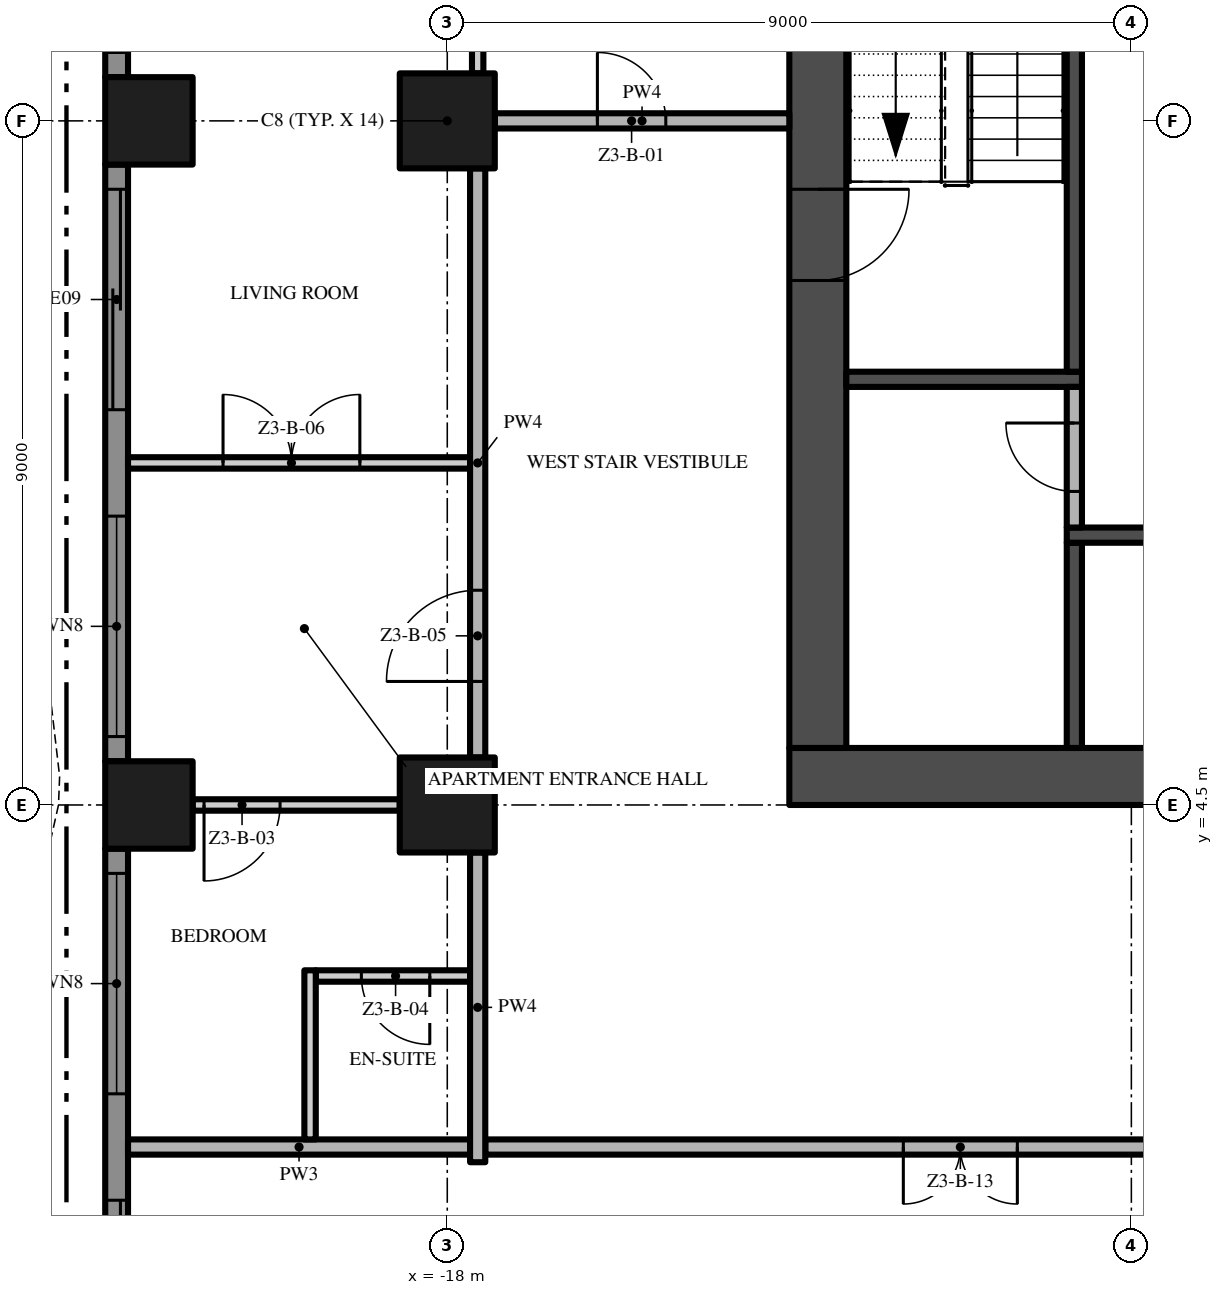
"""IFC4 building model, lengths in metres.
Left out: names, types, materials, properties, quantities, classifications, styles, units other than length and angle.
Written with IfcOpenShell. Run it as: python <this file> out.ifc"""

import sys

from ifc_helpers import new_model, si_unit, direction, frame, frame_2d, origin, origin_2d, place, context, subcontext, project, spatial, polyline, rectangle, outline, extrude, element, fill, save


model = new_model("IFC4")
c1 = context("Model", 3, precision=1e-05, world=origin(), true_north=direction((0.0, 1.0)))
c2 = subcontext(c1, "Body", "Model", "MODEL_VIEW")
j1 = project(units=[si_unit("LENGTHUNIT", "METRE"), si_unit("PLANEANGLEUNIT", "RADIAN")], contexts=[c1])
p1 = place(None, origin())
s1 = spatial("IfcSite", under=j1, at=p1, CompositionType="ELEMENT")
p2 = place(p1, origin())
s2 = spatial("IfcBuilding", under=s1, at=p2, CompositionType="ELEMENT")
p3 = place(p2, frame((0.0, 0.0, 140.2)))
s3 = spatial("IfcBuildingStorey", under=s2, at=p3, CompositionType="ELEMENT", Elevation=140.2)
p4 = place(p3, frame((-13.5, 4.875, -0.3), z_axis=(0.0, 0.0, 1.0), x_axis=(1.0, 0.0, 0.0)))
e1 = element("IfcWall", 1, at=p4, inside=s3, PredefinedType="SHEAR", context=c2, shape_type="SweptSolid", body=[
    extrude(rectangle(XDim=27.0, YDim=0.75, at=frame_2d((13.5, 0.0))), origin(), (0.0, 0.0, 1.0), 3.8),
])
p5 = place(p4, frame((12.0, 0.0, 0.3)))
e2 = element("IfcOpeningElement", 2, at=p5, cuts=e1, PredefinedType="OPENING", context=c2, shape_type="SweptSolid", body=[
    extrude(rectangle(XDim=3.0, YDim=2.4, at=frame_2d((1.5, 1.2))), frame((0.0, 0.385, 0.0), z_axis=(0.0, -1.0, 0.0), x_axis=(1.0, 0.0, 0.0)), (0.0, 0.0, 1.0), 0.77),
])
p6 = place(p4, frame((4.9, 0.0, 0.3)))
e3 = element("IfcOpeningElement", 3, at=p6, cuts=e1, PredefinedType="OPENING", context=c2, shape_type="SweptSolid", body=[
    extrude(rectangle(XDim=1.2, YDim=2.2, at=frame_2d((0.6, 1.1))), frame((0.0, 0.385, 0.0), z_axis=(0.0, -1.0, 0.0), x_axis=(1.0, 0.0, 0.0)), (0.0, 0.0, 1.0), 0.77),
])
p7 = place(p4, frame((20.75, 0.0, 0.3)))
e4 = element("IfcOpeningElement", 4, at=p7, cuts=e1, PredefinedType="OPENING", context=c2, shape_type="SweptSolid", body=[
    extrude(rectangle(XDim=1.5, YDim=2.2, at=frame_2d((0.75, 1.1))), frame((0.0, 0.385, 0.0), z_axis=(0.0, -1.0, 0.0), x_axis=(1.0, 0.0, 0.0)), (0.0, 0.0, 1.0), 0.77),
])
p8 = place(p4, frame((17.4, 0.0, 0.3)))
e5 = element("IfcOpeningElement", 5, at=p8, cuts=e1, PredefinedType="OPENING", context=c2, shape_type="SweptSolid", body=[
    extrude(rectangle(XDim=1.2, YDim=2.2, at=frame_2d((0.6, 1.1))), frame((0.0, 0.385, 0.0), z_axis=(0.0, -1.0, 0.0), x_axis=(1.0, 0.0, 0.0)), (0.0, 0.0, 1.0), 0.77),
])
p9 = place(p3, frame((-13.125, 21.75, -0.3), z_axis=(0.0, 0.0, 1.0), x_axis=(0.0, -1.0, 0.0)))
e6 = element("IfcWall", 6, at=p9, inside=s3, PredefinedType="SHEAR", context=c2, shape_type="SweptSolid", body=[
    extrude(rectangle(XDim=16.5, YDim=0.75, at=frame_2d((8.25, 0.0))), origin(), (0.0, 0.0, 1.0), 3.8),
])
p10 = place(p9, frame((9.15, 0.0, 0.3)))
e7 = element("IfcOpeningElement", 7, at=p10, cuts=e6, PredefinedType="OPENING", context=c2, shape_type="SweptSolid", body=[
    extrude(rectangle(XDim=1.2, YDim=2.2, at=frame_2d((0.6, 1.1))), frame((0.0, 0.385, 0.0), z_axis=(0.0, -1.0, 0.0), x_axis=(1.0, 0.0, 0.0)), (0.0, 0.0, 1.0), 0.77),
])
for number, where, z_axis, x_axis in (
    (8, (-18.0, 13.5, 0.0), (0.0, 0.0, 1.0), (1.0, 0.0, 0.0)),
    (9, (-18.0, 4.5, 0.0), (0.0, 0.0, 1.0), (1.0, 0.0, 0.0)),
):
    element("IfcColumn", number, at=place(p3, frame(where, z_axis=z_axis, x_axis=x_axis)), inside=s3, PredefinedType="COLUMN", context=c2, shape_type="SweptSolid", body=[
        extrude(rectangle(XDim=1.25, YDim=1.25, at=origin_2d()), origin(), (0.0, 0.0, 1.0), 3.5),
    ])
for number, where, z_axis, x_axis in (
    (10, (-21.925, 13.5, 0.0), (0.0, 0.0, 1.0), (1.0, 0.0, 0.0)),
    (11, (-21.925, 4.5, 0.0), (0.0, 0.0, 1.0), (1.0, 0.0, 0.0)),
):
    element("IfcColumn", number, at=place(p3, frame(where, z_axis=z_axis, x_axis=x_axis)), inside=s3, PredefinedType="COLUMN", context=c2, shape_type="SweptSolid", body=[
        extrude(rectangle(XDim=1.15, YDim=1.15, at=origin_2d()), origin(), (0.0, 0.0, 1.0), 3.5),
    ])
p11 = place(p3, frame((-22.35, 14.075, 0.0), z_axis=(0.0, 0.0, 1.0), x_axis=(0.0, 1.0, 0.0)))
e12 = element("IfcWall", 12, at=p11, inside=s3, PredefinedType="SOLIDWALL", context=c2, shape_type="SweptSolid", body=[
    extrude(rectangle(XDim=3.625, YDim=0.3, at=frame_2d((1.812, 0.0))), origin(), (0.0, 0.0, 1.0), 3.5),
])
p12 = place(p11, frame((0.325, 0.0, 0.45)))
e13 = element("IfcOpeningElement", 13, at=p12, cuts=e12, PredefinedType="OPENING", context=c2, shape_type="SweptSolid", body=[
    extrude(rectangle(XDim=2.9, YDim=2.65, at=frame_2d((1.45, 1.325))), frame((0.0, 0.16, 0.0), z_axis=(0.0, -1.0, 0.0), x_axis=(1.0, 0.0, 0.0)), (0.0, 0.0, 1.0), 0.32),
])
p13 = place(p3, frame((-22.35, 5.075, 0.0), z_axis=(0.0, 0.0, 1.0), x_axis=(0.0, 1.0, 0.0)))
e14 = element("IfcWall", 14, at=p13, inside=s3, PredefinedType="SOLIDWALL", context=c2, shape_type="SweptSolid", body=[
    extrude(rectangle(XDim=7.85, YDim=0.3, at=frame_2d((3.925, 0.0))), origin(), (0.0, 0.0, 1.0), 3.5),
])
p14 = place(p13, frame((4.625, 0.0, 0.0)))
e15 = element("IfcOpeningElement", 15, at=p14, cuts=e14, PredefinedType="OPENING", context=c2, shape_type="SweptSolid", body=[
    extrude(rectangle(XDim=2.9, YDim=2.4, at=frame_2d((1.45, 1.2))), frame((0.0, 0.16, 0.0), z_axis=(0.0, -1.0, 0.0), x_axis=(1.0, 0.0, 0.0)), (0.0, 0.0, 1.0), 0.32),
])
p15 = place(p13, frame((0.325, 0.0, 0.45)))
e16 = element("IfcOpeningElement", 16, at=p15, cuts=e14, PredefinedType="OPENING", context=c2, shape_type="SweptSolid", body=[
    extrude(rectangle(XDim=2.9, YDim=2.65, at=frame_2d((1.45, 1.325))), frame((0.0, 0.16, 0.0), z_axis=(0.0, -1.0, 0.0), x_axis=(1.0, 0.0, 0.0)), (0.0, 0.0, 1.0), 0.32),
])
p16 = place(p3, frame((-22.35, -3.925, 0.0), z_axis=(0.0, 0.0, 1.0), x_axis=(0.0, 1.0, 0.0)))
e17 = element("IfcWall", 17, at=p16, inside=s3, PredefinedType="SOLIDWALL", context=c2, shape_type="SweptSolid", body=[
    extrude(rectangle(XDim=7.85, YDim=0.3, at=frame_2d((3.925, 0.0))), origin(), (0.0, 0.0, 1.0), 3.5),
])
p17 = place(p16, frame((4.625, 0.0, 0.45)))
e18 = element("IfcOpeningElement", 18, at=p17, cuts=e17, PredefinedType="OPENING", context=c2, shape_type="SweptSolid", body=[
    extrude(rectangle(XDim=2.9, YDim=2.65, at=frame_2d((1.45, 1.325))), frame((0.0, 0.16, 0.0), z_axis=(0.0, -1.0, 0.0), x_axis=(1.0, 0.0, 0.0)), (0.0, 0.0, 1.0), 0.32),
])
p18 = place(p16, frame((0.325, 0.0, 0.0)))
e19 = element("IfcOpeningElement", 19, at=p18, cuts=e17, PredefinedType="OPENING", context=c2, shape_type="SweptSolid", body=[
    extrude(rectangle(XDim=2.9, YDim=2.4, at=frame_2d((1.45, 1.2))), frame((0.0, 0.16, 0.0), z_axis=(0.0, -1.0, 0.0), x_axis=(1.0, 0.0, 0.0)), (0.0, 0.0, 1.0), 0.32),
])
p19 = place(p3, origin())
e20 = element("IfcWall", 20, at=p19, inside=s3, PredefinedType="USERDEFINED", context=c2, shape_type="SweptSolid", body=[
    extrude(outline(polyline([(-23.451, 18.0), (-24.112, 16.5), (-24.845, 15.0), (-25.369, 13.5), (-25.5, 12.375), (-25.485, 12.0), (-25.149, 10.5), (-24.488, 9.0), (-23.755, 7.5), (-23.231, 6.0), (-23.1, 4.875), (-23.115, 4.5), (-23.451, 3.0), (-24.112, 1.5), (-24.845, 0.0), (-25.369, -1.5), (-25.5, -2.625), (-25.485, -3.0), (-25.149, -4.5), (-24.488, -6.0), (-23.755, -7.5), (-23.231, -9.0), (-23.1, -10.125), (-23.115, -10.5), (-23.451, -12.0), (-24.112, -13.5), (-23.883, -13.601), (-23.213, -12.079), (-22.866, -10.533), (-22.849, -10.115), (-22.986, -8.944), (-23.524, -7.404), (-24.261, -5.895), (-24.91, -4.421), (-25.236, -2.967), (-25.249, -2.635), (-25.124, -1.556), (-24.614, -0.096), (-23.885, 1.395), (-23.213, 2.921), (-22.866, 4.467), (-22.849, 4.885), (-22.986, 6.056), (-23.524, 7.596), (-24.261, 9.105), (-24.91, 10.579), (-25.236, 12.033), (-25.249, 12.365), (-25.124, 13.444), (-24.614, 14.904), (-23.885, 16.395), (-23.223, 17.899), (-23.451, 18.0)])), origin(), (0.0, 0.0, 1.0), 0.9),
])
p20 = place(p3, frame((-12.75, 10.1, 0.0), z_axis=(0.0, 0.0, 1.0), x_axis=(1.0, 0.0, 0.0)))
e21 = element("IfcWall", 21, at=p20, inside=s3, PredefinedType="SHEAR", context=c2, shape_type="SweptSolid", body=[
    extrude(rectangle(XDim=3.1, YDim=0.2, at=frame_2d((1.55, 0.0))), origin(), (0.0, 0.0, 1.0), 3.5),
])
p21 = place(p3, frame((-9.75, 5.25, 0.0), z_axis=(0.0, 0.0, 1.0), x_axis=(0.0, 1.0, 0.0)))
e22 = element("IfcWall", 22, at=p21, inside=s3, PredefinedType="SHEAR", context=c2, shape_type="SweptSolid", body=[
    extrude(rectangle(XDim=2.7, YDim=0.2, at=frame_2d((1.35, 0.0))), origin(), (0.0, 0.0, 1.0), 3.5),
])
p22 = place(p3, frame((-9.85, 8.05, 0.0), z_axis=(0.0, 0.0, 1.0), x_axis=(1.0, 0.0, 0.0)))
e23 = element("IfcWall", 23, at=p22, inside=s3, PredefinedType="SHEAR", context=c2, shape_type="SweptSolid", body=[
    extrude(rectangle(XDim=8.35, YDim=0.2, at=frame_2d((4.175, 0.0))), origin(), (0.0, 0.0, 1.0), 3.5),
])
p23 = place(p3, frame((-9.75, 8.15, 0.0), z_axis=(0.0, 0.0, 1.0), x_axis=(0.0, 1.0, 0.0)))
e24 = element("IfcWall", 24, at=p23, inside=s3, PredefinedType="PARTITIONING", context=c2, shape_type="SweptSolid", body=[
    extrude(rectangle(XDim=1.85, YDim=0.2, at=frame_2d((0.925, 0.0))), origin(), (0.0, 0.0, 1.0), 3.5),
])
p24 = place(p23, frame((0.475, 0.0, 0.0)))
e25 = element("IfcOpeningElement", 25, at=p24, cuts=e24, PredefinedType="OPENING", context=c2, shape_type="SweptSolid", body=[
    extrude(rectangle(XDim=0.9, YDim=2.1, at=frame_2d((0.45, 1.05))), frame((0.0, 0.11, 0.0), z_axis=(0.0, -1.0, 0.0), x_axis=(1.0, 0.0, 0.0)), (0.0, 0.0, 1.0), 0.22),
])
p25 = place(p3, frame((-9.75, 10.2, 0.0), z_axis=(0.0, 0.0, 1.0), x_axis=(0.0, 1.0, 0.0)))
e26 = element("IfcWall", 26, at=p25, inside=s3, PredefinedType="SHEAR", context=c2, shape_type="SweptSolid", body=[
    extrude(rectangle(XDim=5.7, YDim=0.2, at=frame_2d((2.85, 0.0))), origin(), (0.0, 0.0, 1.0), 3.5),
])
p26 = place(p3, frame((17.5, 0.0, 0.0), z_axis=(0.0, 0.0, 1.0), x_axis=(-1.0, 0.0, 0.0)))
e27 = element("IfcWall", 27, at=p26, inside=s3, PredefinedType="PARTITIONING", context=c2, shape_type="SweptSolid", body=[
    extrude(rectangle(XDim=35.0, YDim=0.2, at=frame_2d((17.5, 0.0))), origin(), (0.0, 0.0, 1.0), 3.5),
])
p27 = place(p26, frame((28.0, 0.0, 0.0)))
e28 = element("IfcOpeningElement", 28, at=p27, cuts=e27, PredefinedType="OPENING", context=c2, shape_type="SweptSolid", body=[
    extrude(rectangle(XDim=1.5, YDim=2.4, at=frame_2d((0.75, 1.2))), frame((0.0, 0.11, 0.0), z_axis=(0.0, -1.0, 0.0), x_axis=(1.0, 0.0, 0.0)), (0.0, 0.0, 1.0), 0.22),
])
p28 = place(p26, frame((10.0, 0.0, 0.0)))
e29 = element("IfcOpeningElement", 29, at=p28, cuts=e27, PredefinedType="OPENING", context=c2, shape_type="SweptSolid", body=[
    extrude(rectangle(XDim=1.5, YDim=2.4, at=frame_2d((0.75, 1.2))), frame((0.0, 0.11, 0.0), z_axis=(0.0, -1.0, 0.0), x_axis=(1.0, 0.0, 0.0)), (0.0, 0.0, 1.0), 0.22),
])
p29 = place(p3, frame((-22.2, 0.0, 0.0), z_axis=(0.0, 0.0, 1.0), x_axis=(1.0, 0.0, 0.0)))
e30 = element("IfcWall", 30, at=p29, inside=s3, PredefinedType="PARTITIONING", context=c2, shape_type="SweptSolid", body=[
    extrude(rectangle(XDim=4.5, YDim=0.2, at=frame_2d((2.25, 0.0))), origin(), (0.0, 0.0, 1.0), 3.5),
])
p30 = place(p3, frame((-17.7, 2.25, 0.0), z_axis=(0.0, 0.0, 1.0), x_axis=(-1.0, 0.0, 0.0)))
e31 = element("IfcWall", 31, at=p30, inside=s3, PredefinedType="PARTITIONING", context=c2, shape_type="SweptSolid", body=[
    extrude(rectangle(XDim=2.03, YDim=0.15, at=frame_2d((1.015, 0.0))), origin(), (0.0, 0.0, 1.0), 3.5),
])
p31 = place(p30, frame((0.53, 0.0, 0.0)))
e32 = element("IfcOpeningElement", 32, at=p31, cuts=e31, PredefinedType="OPENING", context=c2, shape_type="SweptSolid", body=[
    extrude(rectangle(XDim=0.9, YDim=2.1, at=frame_2d((0.45, 1.05))), frame((0.0, 0.085, 0.0), z_axis=(0.0, -1.0, 0.0), x_axis=(1.0, 0.0, 0.0)), (0.0, 0.0, 1.0), 0.17),
])
p32 = place(p3, frame((-18.625, 4.5, 0.0), z_axis=(0.0, 0.0, 1.0), x_axis=(-1.0, 0.0, 0.0)))
e33 = element("IfcWall", 33, at=p32, inside=s3, PredefinedType="PARTITIONING", context=c2, shape_type="SweptSolid", body=[
    extrude(rectangle(XDim=2.725, YDim=0.15, at=frame_2d((1.363, 0.0))), origin(), (0.0, 0.0, 1.0), 3.5),
])
p33 = place(p32, frame((1.575, 0.0, 0.0)))
e34 = element("IfcOpeningElement", 34, at=p33, cuts=e33, PredefinedType="OPENING", context=c2, shape_type="SweptSolid", body=[
    extrude(rectangle(XDim=1.0, YDim=2.4, at=frame_2d((0.5, 1.2))), frame((0.0, 0.085, 0.0), z_axis=(0.0, -1.0, 0.0), x_axis=(1.0, 0.0, 0.0)), (0.0, 0.0, 1.0), 0.17),
])
p34 = place(p3, frame((-22.2, 9.0, 0.0), z_axis=(0.0, 0.0, 1.0), x_axis=(1.0, 0.0, 0.0)))
e35 = element("IfcWall", 35, at=p34, inside=s3, PredefinedType="PARTITIONING", context=c2, shape_type="SweptSolid", body=[
    extrude(rectangle(XDim=4.5, YDim=0.15, at=frame_2d((2.25, 0.0))), origin(), (0.0, 0.0, 1.0), 3.5),
])
p35 = place(p34, frame((1.25, 0.0, 0.0)))
e36 = element("IfcOpeningElement", 36, at=p35, cuts=e35, PredefinedType="OPENING", context=c2, shape_type="SweptSolid", body=[
    extrude(rectangle(XDim=1.8, YDim=2.4, at=frame_2d((0.9, 1.2))), frame((0.0, 0.085, 0.0), z_axis=(0.0, -1.0, 0.0), x_axis=(1.0, 0.0, 0.0)), (0.0, 0.0, 1.0), 0.17),
])
p36 = place(p3, frame((-17.375, 13.5, 0.0), z_axis=(0.0, 0.0, 1.0), x_axis=(1.0, 0.0, 0.0)))
e37 = element("IfcWall", 37, at=p36, inside=s3, PredefinedType="PARTITIONING", context=c2, shape_type="SweptSolid", body=[
    extrude(rectangle(XDim=3.875, YDim=0.2, at=frame_2d((1.938, 0.0))), origin(), (0.0, 0.0, 1.0), 3.5),
])
p37 = place(p36, frame((1.35, 0.0, 0.0)))
e38 = element("IfcOpeningElement", 38, at=p37, cuts=e37, PredefinedType="OPENING", context=c2, shape_type="SweptSolid", body=[
    extrude(rectangle(XDim=0.9, YDim=2.1, at=frame_2d((0.45, 1.05))), frame((0.0, 0.11, 0.0), z_axis=(0.0, -1.0, 0.0), x_axis=(1.0, 0.0, 0.0)), (0.0, 0.0, 1.0), 0.22),
])
p38 = place(p3, frame((-19.805, 0.1, 0.0), z_axis=(0.0, 0.0, 1.0), x_axis=(0.0, 1.0, 0.0)))
e39 = element("IfcWall", 39, at=p38, inside=s3, PredefinedType="PARTITIONING", context=c2, shape_type="SweptSolid", body=[
    extrude(rectangle(XDim=2.225, YDim=0.15, at=frame_2d((1.113, 0.0))), origin(), (0.0, 0.0, 1.0), 3.5),
])
p39 = place(p3, frame((-17.6, -0.2, 0.0), z_axis=(0.0, 0.0, 1.0), x_axis=(0.0, 1.0, 0.0)))
e40 = element("IfcWall", 40, at=p39, inside=s3, PredefinedType="PARTITIONING", context=c2, shape_type="SweptSolid", body=[
    extrude(rectangle(XDim=4.075, YDim=0.2, at=frame_2d((2.038, 0.0))), origin(), (0.0, 0.0, 1.0), 3.5),
])
p40 = place(p3, frame((-17.6, 5.125, 0.0), z_axis=(0.0, 0.0, 1.0), x_axis=(0.0, 1.0, 0.0)))
e41 = element("IfcWall", 41, at=p40, inside=s3, PredefinedType="PARTITIONING", context=c2, shape_type="SweptSolid", body=[
    extrude(rectangle(XDim=7.75, YDim=0.2, at=frame_2d((3.875, 0.0))), origin(), (0.0, 0.0, 1.0), 3.5),
])
p41 = place(p40, frame((1.0, 0.0, 0.0)))
e42 = element("IfcOpeningElement", 42, at=p41, cuts=e41, PredefinedType="OPENING", context=c2, shape_type="SweptSolid", body=[
    extrude(rectangle(XDim=1.2, YDim=2.4, at=frame_2d((0.6, 1.2))), frame((0.0, 0.11, 0.0), z_axis=(0.0, -1.0, 0.0), x_axis=(1.0, 0.0, 0.0)), (0.0, 0.0, 1.0), 0.22),
])
p42 = place(p3, frame((-17.6, 14.125, 0.0), z_axis=(0.0, 0.0, 1.0), x_axis=(0.0, 1.0, 0.0)))
e43 = element("IfcWall", 43, at=p42, inside=s3, PredefinedType="PARTITIONING", context=c2, shape_type="SweptSolid", body=[
    extrude(rectangle(XDim=3.3, YDim=0.15, at=frame_2d((1.65, 0.0))), origin(), (0.0, 0.0, 1.0), 3.5),
])
p43 = place(p12, origin())
e44 = element("IfcWindow", 44, at=p43, inside=s3, PartitioningType="SINGLE_PANEL", PredefinedType="WINDOW", context=c2, shape_type="SweptSolid", body=[
    extrude(rectangle(XDim=2.9, YDim=2.65, at=frame_2d((1.45, 1.325))), frame((0.0, 0.03, 0.0), z_axis=(0.0, -1.0, 0.0), x_axis=(1.0, 0.0, 0.0)), (0.0, 0.0, 1.0), 0.06),
])
fill(e13, e44)
p44 = place(p14, origin())
e45 = element("IfcDoor", 45, at=p44, inside=s3, OperationType="SINGLE_SWING_LEFT", PredefinedType="DOOR", context=c2, shape_type="SweptSolid", body=[
    extrude(rectangle(XDim=2.9, YDim=2.4, at=frame_2d((1.45, 1.2))), frame((0.0, 0.025, 0.0), z_axis=(0.0, -1.0, 0.0), x_axis=(1.0, 0.0, 0.0)), (0.0, 0.0, 1.0), 0.05),
])
fill(e15, e45)
p45 = place(p15, origin())
e46 = element("IfcWindow", 46, at=p45, inside=s3, PartitioningType="SINGLE_PANEL", PredefinedType="WINDOW", context=c2, shape_type="SweptSolid", body=[
    extrude(rectangle(XDim=2.9, YDim=2.65, at=frame_2d((1.45, 1.325))), frame((0.0, 0.03, 0.0), z_axis=(0.0, -1.0, 0.0), x_axis=(1.0, 0.0, 0.0)), (0.0, 0.0, 1.0), 0.06),
])
fill(e16, e46)
p46 = place(p17, origin())
e47 = element("IfcWindow", 47, at=p46, inside=s3, PartitioningType="SINGLE_PANEL", PredefinedType="WINDOW", context=c2, shape_type="SweptSolid", body=[
    extrude(rectangle(XDim=2.9, YDim=2.65, at=frame_2d((1.45, 1.325))), frame((0.0, 0.03, 0.0), z_axis=(0.0, -1.0, 0.0), x_axis=(1.0, 0.0, 0.0)), (0.0, 0.0, 1.0), 0.06),
])
fill(e18, e47)
p47 = place(p18, origin())
e48 = element("IfcDoor", 48, at=p47, inside=s3, OperationType="SINGLE_SWING_LEFT", PredefinedType="DOOR", context=c2, shape_type="SweptSolid", body=[
    extrude(rectangle(XDim=2.9, YDim=2.4, at=frame_2d((1.45, 1.2))), frame((0.0, 0.025, 0.0), z_axis=(0.0, -1.0, 0.0), x_axis=(1.0, 0.0, 0.0)), (0.0, 0.0, 1.0), 0.05),
])
fill(e19, e48)
p48 = place(p10, frame((1.2, 0.0, 0.0), z_axis=(0.0, 0.0, 1.0), x_axis=(-1.0, 0.0, 0.0)))
e49 = element("IfcDoor", 49, at=p48, inside=s3, OperationType="SINGLE_SWING_RIGHT", PredefinedType="DOOR", context=c2, shape_type="SweptSolid", body=[
    extrude(rectangle(XDim=1.2, YDim=2.2, at=frame_2d((0.6, 1.1))), frame((0.0, 0.025, 0.0), z_axis=(0.0, -1.0, 0.0), x_axis=(1.0, 0.0, 0.0)), (0.0, 0.0, 1.0), 0.05),
])
fill(e7, e49)
p49 = place(p24, origin())
e50 = element("IfcDoor", 50, at=p49, inside=s3, OperationType="SINGLE_SWING_RIGHT", PredefinedType="DOOR", context=c2, shape_type="SweptSolid", body=[
    extrude(rectangle(XDim=0.9, YDim=2.1, at=frame_2d((0.45, 1.05))), frame((0.0, 0.025, 0.0), z_axis=(0.0, -1.0, 0.0), x_axis=(1.0, 0.0, 0.0)), (0.0, 0.0, 1.0), 0.05),
])
fill(e25, e50)
p50 = place(p37, origin())
e51 = element("IfcDoor", 51, at=p50, inside=s3, OperationType="SINGLE_SWING_LEFT", PredefinedType="DOOR", context=c2, shape_type="SweptSolid", body=[
    extrude(rectangle(XDim=0.9, YDim=2.1, at=frame_2d((0.45, 1.05))), frame((0.0, 0.025, 0.0), z_axis=(0.0, -1.0, 0.0), x_axis=(1.0, 0.0, 0.0)), (0.0, 0.0, 1.0), 0.05),
])
fill(e38, e51)
p51 = place(p33, origin())
e52 = element("IfcDoor", 52, at=p51, inside=s3, OperationType="SINGLE_SWING_RIGHT", PredefinedType="DOOR", context=c2, shape_type="SweptSolid", body=[
    extrude(rectangle(XDim=1.0, YDim=2.4, at=frame_2d((0.5, 1.2))), frame((0.0, 0.025, 0.0), z_axis=(0.0, -1.0, 0.0), x_axis=(1.0, 0.0, 0.0)), (0.0, 0.0, 1.0), 0.05),
])
fill(e34, e52)
p52 = place(p31, origin())
e53 = element("IfcDoor", 53, at=p52, inside=s3, OperationType="SINGLE_SWING_LEFT", PredefinedType="DOOR", context=c2, shape_type="SweptSolid", body=[
    extrude(rectangle(XDim=0.9, YDim=2.1, at=frame_2d((0.45, 1.05))), frame((0.0, 0.025, 0.0), z_axis=(0.0, -1.0, 0.0), x_axis=(1.0, 0.0, 0.0)), (0.0, 0.0, 1.0), 0.05),
])
fill(e32, e53)
p53 = place(p41, origin())
e54 = element("IfcDoor", 54, at=p53, inside=s3, OperationType="SINGLE_SWING_LEFT", PredefinedType="DOOR", context=c2, shape_type="SweptSolid", body=[
    extrude(rectangle(XDim=1.2, YDim=2.4, at=frame_2d((0.6, 1.2))), frame((0.0, 0.025, 0.0), z_axis=(0.0, -1.0, 0.0), x_axis=(1.0, 0.0, 0.0)), (0.0, 0.0, 1.0), 0.05),
])
fill(e42, e54)
p54 = place(p35, origin())
e55 = element("IfcDoor", 55, at=p54, inside=s3, OperationType="DOUBLE_DOOR_SINGLE_SWING", PredefinedType="DOOR", context=c2, shape_type="SweptSolid", body=[
    extrude(rectangle(XDim=1.8, YDim=2.4, at=frame_2d((0.9, 1.2))), frame((0.0, 0.025, 0.0), z_axis=(0.0, -1.0, 0.0), x_axis=(1.0, 0.0, 0.0)), (0.0, 0.0, 1.0), 0.05),
])
fill(e36, e55)
p55 = place(p27, origin())
e56 = element("IfcDoor", 56, at=p55, inside=s3, OperationType="DOUBLE_DOOR_SINGLE_SWING", PredefinedType="DOOR", context=c2, shape_type="SweptSolid", body=[
    extrude(rectangle(XDim=1.5, YDim=2.4, at=frame_2d((0.75, 1.2))), frame((0.0, 0.025, 0.0), z_axis=(0.0, -1.0, 0.0), x_axis=(1.0, 0.0, 0.0)), (0.0, 0.0, 1.0), 0.05),
])
fill(e28, e56)
save(model, sys.argv[1])
